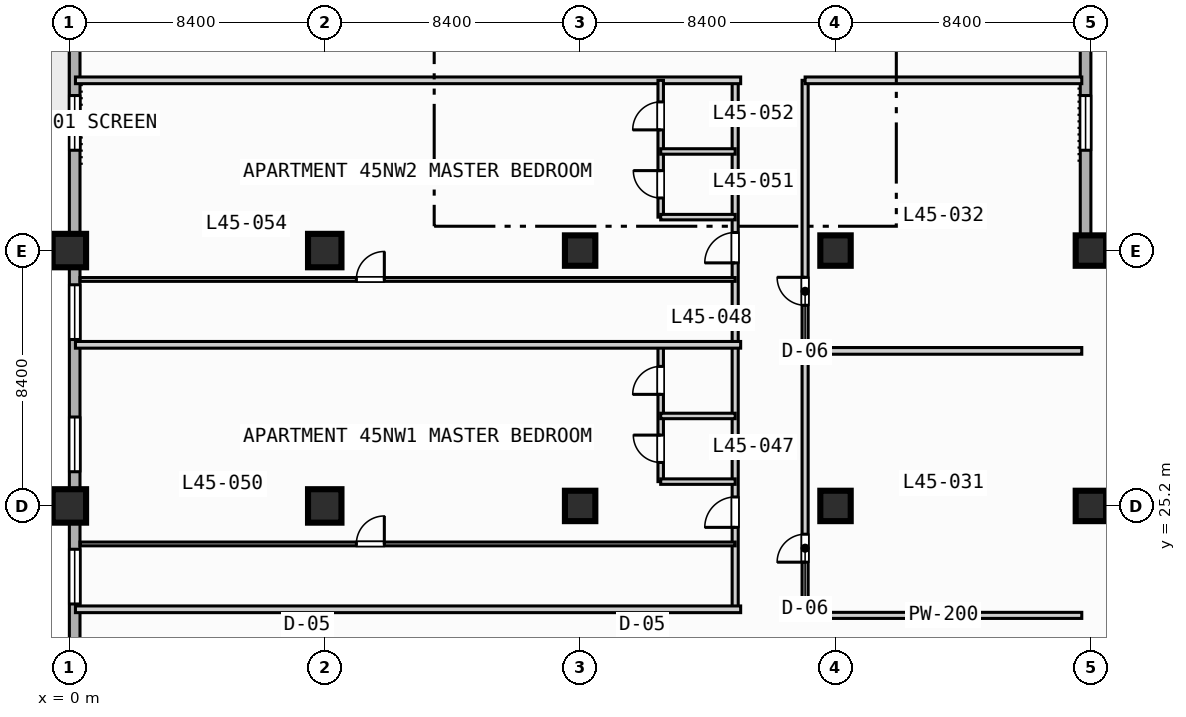
"""IFC4 building model, lengths in metres.
Left out: names, types, materials, properties, quantities, classifications, styles, units other than length and angle.
Written with IfcOpenShell. Run it as: python <this file> out.ifc"""

import sys

from ifc_helpers import new_model, si_unit, direction, frame, frame_2d, origin, origin_2d, place, context, subcontext, project, spatial, rectangle, extrude, element, fill, save


model = new_model("IFC4")
c1 = context("Model", 3, precision=1e-05, world=origin(), true_north=direction((0.0, 1.0)))
c2 = subcontext(c1, "Body", "Model", "MODEL_VIEW")
j1 = project(units=[si_unit("LENGTHUNIT", "METRE"), si_unit("PLANEANGLEUNIT", "RADIAN")], contexts=[c1])
p1 = place(None, origin())
s1 = spatial("IfcSite", under=j1, at=p1, CompositionType="ELEMENT")
p2 = place(p1, origin())
s2 = spatial("IfcBuilding", under=s1, at=p2, CompositionType="ELEMENT")
p3 = place(p2, frame((0.0, 0.0, 186.5)))
s3 = spatial("IfcBuildingStorey", under=s2, at=p3, CompositionType="ELEMENT", Elevation=186.5)
for number, where, z_axis, x_axis in (
    (1, (0.0, 25.2, 0.0), (0.0, 0.0, 1.0), (1.0, 0.0, 0.0)),
    (2, (0.0, 33.6, 0.0), (0.0, 0.0, 1.0), (1.0, 0.0, 0.0)),
    (3, (8.4, 25.2, 0.0), (0.0, 0.0, 1.0), (1.0, 0.0, 0.0)),
    (4, (8.4, 33.6, 0.0), (0.0, 0.0, 1.0), (1.0, 0.0, 0.0)),
):
    element("IfcColumn", number, at=place(p3, frame(where, z_axis=z_axis, x_axis=x_axis)), inside=s3, PredefinedType="COLUMN", context=c2, shape_type="SweptSolid", body=[
        extrude(rectangle(XDim=1.1, YDim=1.1, at=origin_2d()), origin(), (0.0, 0.0, 1.0), 3.7),
    ])
for number, where, z_axis, x_axis in (
    (5, (16.8, 25.2, 0.0), (0.0, 0.0, 1.0), (1.0, 0.0, 0.0)),
    (6, (16.8, 33.6, 0.0), (0.0, 0.0, 1.0), (1.0, 0.0, 0.0)),
    (7, (25.2, 25.2, 0.0), (0.0, 0.0, 1.0), (1.0, 0.0, 0.0)),
    (8, (25.2, 33.6, 0.0), (0.0, 0.0, 1.0), (1.0, 0.0, 0.0)),
    (9, (33.6, 25.2, 0.0), (0.0, 0.0, 1.0), (1.0, 0.0, 0.0)),
    (10, (33.6, 33.6, 0.0), (0.0, 0.0, 1.0), (1.0, 0.0, 0.0)),
):
    element("IfcColumn", number, at=place(p3, frame(where, z_axis=z_axis, x_axis=x_axis)), inside=s3, PredefinedType="COLUMN", context=c2, shape_type="SweptSolid", body=[
        extrude(rectangle(XDim=1.0, YDim=1.0, at=origin_2d()), origin(), (0.0, 0.0, 1.0), 3.7),
    ])
p4 = place(p3, frame((0.175, 3.175, 0.0), z_axis=(0.0, 0.0, 1.0), x_axis=(0.0, 1.0, 0.0)))
e11 = element("IfcWall", 11, at=p4, inside=s3, PredefinedType="STANDARD", context=c2, shape_type="SweptSolid", body=[
    extrude(rectangle(XDim=69.25, YDim=0.35, at=frame_2d((34.625, 0.0))), origin(), (0.0, 0.0, 1.0), 3.47),
])
p5 = place(p4, frame((42.325, 0.0, 0.0)))
e12 = element("IfcOpeningElement", 12, at=p5, cuts=e11, PredefinedType="OPENING", context=c2, shape_type="SweptSolid", body=[
    extrude(rectangle(XDim=1.4, YDim=2.2, at=frame_2d((0.7, 1.1))), frame((0.0, 0.185, 0.0), z_axis=(0.0, -1.0, 0.0), x_axis=(1.0, 0.0, 0.0)), (0.0, 0.0, 1.0), 0.37),
])
p6 = place(p4, frame((33.725, 0.0, 0.85)))
e13 = element("IfcOpeningElement", 13, at=p6, cuts=e11, PredefinedType="OPENING", context=c2, shape_type="SweptSolid", body=[
    extrude(rectangle(XDim=1.8, YDim=1.8, at=frame_2d((0.9, 0.9))), frame((0.0, 0.185, 0.0), z_axis=(0.0, -1.0, 0.0), x_axis=(1.0, 0.0, 0.0)), (0.0, 0.0, 1.0), 0.37),
])
p7 = place(p4, frame((18.8, 0.0, 0.85)))
e14 = element("IfcOpeningElement", 14, at=p7, cuts=e11, PredefinedType="OPENING", context=c2, shape_type="SweptSolid", body=[
    extrude(rectangle(XDim=1.8, YDim=1.8, at=frame_2d((0.9, 0.9))), frame((0.0, 0.185, 0.0), z_axis=(0.0, -1.0, 0.0), x_axis=(1.0, 0.0, 0.0)), (0.0, 0.0, 1.0), 0.37),
])
p8 = place(p4, frame((23.15, 0.0, 0.85)))
e15 = element("IfcOpeningElement", 15, at=p8, cuts=e11, PredefinedType="OPENING", context=c2, shape_type="SweptSolid", body=[
    extrude(rectangle(XDim=1.8, YDim=1.8, at=frame_2d((0.9, 0.9))), frame((0.0, 0.185, 0.0), z_axis=(0.0, -1.0, 0.0), x_axis=(1.0, 0.0, 0.0)), (0.0, 0.0, 1.0), 0.37),
])
p9 = place(p4, frame((27.5, 0.0, 0.85)))
e16 = element("IfcOpeningElement", 16, at=p9, cuts=e11, PredefinedType="OPENING", context=c2, shape_type="SweptSolid", body=[
    extrude(rectangle(XDim=1.8, YDim=1.8, at=frame_2d((0.9, 0.9))), frame((0.0, 0.185, 0.0), z_axis=(0.0, -1.0, 0.0), x_axis=(1.0, 0.0, 0.0)), (0.0, 0.0, 1.0), 0.37),
])
p10 = place(p3, frame((33.425, 72.425, 0.0), z_axis=(0.0, 0.0, 1.0), x_axis=(0.0, -1.0, 0.0)))
e17 = element("IfcWall", 17, at=p10, inside=s3, PredefinedType="STANDARD", context=c2, shape_type="SweptSolid", body=[
    extrude(rectangle(XDim=39.0, YDim=0.35, at=frame_2d((19.5, 0.0))), origin(), (0.0, 0.0, 1.0), 3.47),
])
p11 = place(p10, frame((33.725, 0.0, 0.85)))
e18 = element("IfcOpeningElement", 18, at=p11, cuts=e17, PredefinedType="OPENING", context=c2, shape_type="SweptSolid", body=[
    extrude(rectangle(XDim=1.8, YDim=1.8, at=frame_2d((0.9, 0.9))), frame((0.0, 0.185, 0.0), z_axis=(0.0, -1.0, 0.0), x_axis=(1.0, 0.0, 0.0)), (0.0, 0.0, 1.0), 0.37),
])
p12 = place(p10, frame((16.925, 0.0, 0.85)))
e19 = element("IfcOpeningElement", 19, at=p12, cuts=e17, PredefinedType="OPENING", context=c2, shape_type="SweptSolid", body=[
    extrude(rectangle(XDim=1.8, YDim=1.8, at=frame_2d((0.9, 0.9))), frame((0.0, 0.185, 0.0), z_axis=(0.0, -1.0, 0.0), x_axis=(1.0, 0.0, 0.0)), (0.0, 0.0, 1.0), 0.37),
])
p13 = place(p10, frame((8.225, 0.0, 0.85)))
e20 = element("IfcOpeningElement", 20, at=p13, cuts=e17, PredefinedType="OPENING", context=c2, shape_type="SweptSolid", body=[
    extrude(rectangle(XDim=2.4, YDim=1.95, at=frame_2d((1.2, 0.975))), frame((0.0, 0.185, 0.0), z_axis=(0.0, -1.0, 0.0), x_axis=(1.0, 0.0, 0.0)), (0.0, 0.0, 1.0), 0.37),
])
p14 = place(p3, frame((33.425, 33.425, 0.0), z_axis=(0.0, 0.0, 1.0), x_axis=(1.0, 0.0, 0.0)))
e21 = element("IfcWall", 21, at=p14, inside=s3, PredefinedType="STANDARD", context=c2, shape_type="SweptSolid", body=[
    extrude(rectangle(XDim=39.0, YDim=0.35, at=frame_2d((19.5, 0.0))), origin(), (0.0, 0.0, 1.0), 3.47),
])
p15 = place(p14, frame((12.075, 0.0, 0.0)))
e22 = element("IfcOpeningElement", 22, at=p15, cuts=e21, PredefinedType="OPENING", context=c2, shape_type="SweptSolid", body=[
    extrude(rectangle(XDim=1.4, YDim=2.2, at=frame_2d((0.7, 1.1))), frame((0.0, 0.185, 0.0), z_axis=(0.0, -1.0, 0.0), x_axis=(1.0, 0.0, 0.0)), (0.0, 0.0, 1.0), 0.37),
])
p16 = place(p14, frame((20.275, 0.0, 0.85)))
e23 = element("IfcOpeningElement", 23, at=p16, cuts=e21, PredefinedType="OPENING", context=c2, shape_type="SweptSolid", body=[
    extrude(rectangle(XDim=1.8, YDim=1.8, at=frame_2d((0.9, 0.9))), frame((0.0, 0.185, 0.0), z_axis=(0.0, -1.0, 0.0), x_axis=(1.0, 0.0, 0.0)), (0.0, 0.0, 1.0), 0.37),
])
p17 = place(p14, frame((28.375, 0.0, 0.85)))
e24 = element("IfcOpeningElement", 24, at=p17, cuts=e21, PredefinedType="OPENING", context=c2, shape_type="SweptSolid", body=[
    extrude(rectangle(XDim=2.4, YDim=1.95, at=frame_2d((1.2, 0.975))), frame((0.0, 0.185, 0.0), z_axis=(0.0, -1.0, 0.0), x_axis=(1.0, 0.0, 0.0)), (0.0, 0.0, 1.0), 0.37),
])
p18 = place(p3, frame((24.2, 21.6, 0.0), z_axis=(0.0, 0.0, 1.0), x_axis=(0.0, 1.0, 0.0)))
e25 = element("IfcWall", 25, at=p18, inside=s3, PredefinedType="PARTITIONING", context=c2, shape_type="SweptSolid", body=[
    extrude(rectangle(XDim=17.6, YDim=0.2, at=frame_2d((8.8, 0.0))), origin(), (0.0, 0.0, 1.0), 3.47),
])
p19 = place(p18, frame((1.75, 0.0, 0.0)))
e26 = element("IfcOpeningElement", 26, at=p19, cuts=e25, PredefinedType="OPENING", context=c2, shape_type="SweptSolid", body=[
    extrude(rectangle(XDim=0.92, YDim=2.1, at=frame_2d((0.46, 1.05))), frame((0.0, 0.11, 0.0), z_axis=(0.0, -1.0, 0.0), x_axis=(1.0, 0.0, 0.0)), (0.0, 0.0, 1.0), 0.22),
])
p20 = place(p18, frame((10.2, 0.0, 0.0)))
e27 = element("IfcOpeningElement", 27, at=p20, cuts=e25, PredefinedType="OPENING", context=c2, shape_type="SweptSolid", body=[
    extrude(rectangle(XDim=0.92, YDim=2.1, at=frame_2d((0.46, 1.05))), frame((0.0, 0.11, 0.0), z_axis=(0.0, -1.0, 0.0), x_axis=(1.0, 0.0, 0.0)), (0.0, 0.0, 1.0), 0.22),
])
p21 = place(p3, frame((24.2, 21.6, 0.0), z_axis=(0.0, 0.0, 1.0), x_axis=(1.0, 0.0, 0.0)))
e28 = element("IfcWall", 28, at=p21, inside=s3, PredefinedType="PARTITIONING", context=c2, shape_type="SweptSolid", body=[
    extrude(rectangle(XDim=9.1, YDim=0.2, at=frame_2d((4.55, 0.0))), origin(), (0.0, 0.0, 1.0), 3.47),
])
for number, where, z_axis, x_axis in (
    (29, (24.2, 30.3, 0.0), (0.0, 0.0, 1.0), (1.0, 0.0, 0.0)),
    (30, (24.2, 39.2, 0.0), (0.0, 0.0, 1.0), (1.0, 0.0, 0.0)),
):
    element("IfcWall", number, at=place(p3, frame(where, z_axis=z_axis, x_axis=x_axis)), inside=s3, PredefinedType="PARTITIONING", context=c2, shape_type="SweptSolid", body=[
        extrude(rectangle(XDim=9.1, YDim=0.22, at=frame_2d((4.55, 0.0))), origin(), (0.0, 0.0, 1.0), 3.47),
    ])
p22 = place(p3, frame((21.9, 21.8, 0.0), z_axis=(0.0, 0.0, 1.0), x_axis=(0.0, 1.0, 0.0)))
e31 = element("IfcWall", 31, at=p22, inside=s3, PredefinedType="PARTITIONING", context=c2, shape_type="SweptSolid", body=[
    extrude(rectangle(XDim=17.4, YDim=0.2, at=frame_2d((8.7, 0.0))), origin(), (0.0, 0.0, 1.0), 3.47),
])
p23 = place(p22, frame((2.695, 0.0, 0.0)))
e32 = element("IfcOpeningElement", 32, at=p23, cuts=e31, PredefinedType="OPENING", context=c2, shape_type="SweptSolid", body=[
    extrude(rectangle(XDim=1.0, YDim=2.15, at=frame_2d((0.5, 1.075))), frame((0.0, 0.11, 0.0), z_axis=(0.0, -1.0, 0.0), x_axis=(1.0, 0.0, 0.0)), (0.0, 0.0, 1.0), 0.22),
])
p24 = place(p22, frame((11.395, 0.0, 0.0)))
e33 = element("IfcOpeningElement", 33, at=p24, cuts=e31, PredefinedType="OPENING", context=c2, shape_type="SweptSolid", body=[
    extrude(rectangle(XDim=1.0, YDim=2.15, at=frame_2d((0.5, 1.075))), frame((0.0, 0.11, 0.0), z_axis=(0.0, -1.0, 0.0), x_axis=(1.0, 0.0, 0.0)), (0.0, 0.0, 1.0), 0.22),
])
p25 = place(p3, frame((0.2, 21.8, 0.0), z_axis=(0.0, 0.0, 1.0), x_axis=(1.0, 0.0, 0.0)))
e34 = element("IfcWall", 34, at=p25, inside=s3, PredefinedType="PARTITIONING", context=c2, shape_type="SweptSolid", body=[
    extrude(rectangle(XDim=21.88, YDim=0.22, at=frame_2d((10.94, 0.0))), origin(), (0.0, 0.0, 1.0), 3.47),
])
p26 = place(p3, frame((19.45, 26.0, 0.0), z_axis=(0.0, 0.0, 1.0), x_axis=(0.0, 1.0, 0.0)))
e35 = element("IfcWall", 35, at=p26, inside=s3, PredefinedType="PLUMBINGWALL", context=c2, shape_type="SweptSolid", body=[
    extrude(rectangle(XDim=4.5, YDim=0.18, at=frame_2d((2.25, 0.0))), origin(), (0.0, 0.0, 1.0), 3.47),
])
p27 = place(p26, frame((0.63, 0.0, 0.0)))
e36 = element("IfcOpeningElement", 36, at=p27, cuts=e35, PredefinedType="OPENING", context=c2, shape_type="SweptSolid", body=[
    extrude(rectangle(XDim=0.9, YDim=2.1, at=frame_2d((0.45, 1.05))), frame((0.0, 0.1, 0.0), z_axis=(0.0, -1.0, 0.0), x_axis=(1.0, 0.0, 0.0)), (0.0, 0.0, 1.0), 0.2),
])
p28 = place(p26, frame((2.87, 0.0, 0.0)))
e37 = element("IfcOpeningElement", 37, at=p28, cuts=e35, PredefinedType="OPENING", context=c2, shape_type="SweptSolid", body=[
    extrude(rectangle(XDim=0.92, YDim=2.1, at=frame_2d((0.46, 1.05))), frame((0.0, 0.1, 0.0), z_axis=(0.0, -1.0, 0.0), x_axis=(1.0, 0.0, 0.0)), (0.0, 0.0, 1.0), 0.2),
])
for number, where, z_axis, x_axis in (
    (38, (19.45, 26.0, 0.0), (0.0, 0.0, 1.0), (1.0, 0.0, 0.0)),
    (39, (19.45, 28.16, 0.0), (0.0, 0.0, 1.0), (1.0, 0.0, 0.0)),
):
    element("IfcWall", number, at=place(p3, frame(where, z_axis=z_axis, x_axis=x_axis)), inside=s3, PredefinedType="PLUMBINGWALL", context=c2, shape_type="SweptSolid", body=[
        extrude(rectangle(XDim=2.45, YDim=0.18, at=frame_2d((1.225, 0.0))), origin(), (0.0, 0.0, 1.0), 3.47),
    ])
p29 = place(p3, frame((0.35, 23.95, 0.0), z_axis=(0.0, 0.0, 1.0), x_axis=(1.0, 0.0, 0.0)))
e40 = element("IfcWall", 40, at=p29, inside=s3, PredefinedType="PARTITIONING", context=c2, shape_type="SweptSolid", body=[
    extrude(rectangle(XDim=21.55, YDim=0.125, at=frame_2d((10.775, 0.0))), origin(), (0.0, 0.0, 1.0), 3.47),
])
p30 = place(p29, frame((9.09, 0.0, 0.0)))
e41 = element("IfcOpeningElement", 41, at=p30, cuts=e40, PredefinedType="OPENING", context=c2, shape_type="SweptSolid", body=[
    extrude(rectangle(XDim=0.92, YDim=2.1, at=frame_2d((0.46, 1.05))), frame((0.0, 0.073, 0.0), z_axis=(0.0, -1.0, 0.0), x_axis=(1.0, 0.0, 0.0)), (0.0, 0.0, 1.0), 0.145),
])
for number, where, z_axis, x_axis in (
    (42, (0.2, 30.5, 0.0), (0.0, 0.0, 1.0), (1.0, 0.0, 0.0)),
    (43, (0.2, 39.2, 0.0), (0.0, 0.0, 1.0), (1.0, 0.0, 0.0)),
):
    element("IfcWall", number, at=place(p3, frame(where, z_axis=z_axis, x_axis=x_axis)), inside=s3, PredefinedType="PARTITIONING", context=c2, shape_type="SweptSolid", body=[
        extrude(rectangle(XDim=21.88, YDim=0.22, at=frame_2d((10.94, 0.0))), origin(), (0.0, 0.0, 1.0), 3.47),
    ])
p31 = place(p3, frame((19.45, 34.7, 0.0), z_axis=(0.0, 0.0, 1.0), x_axis=(0.0, 1.0, 0.0)))
e44 = element("IfcWall", 44, at=p31, inside=s3, PredefinedType="PLUMBINGWALL", context=c2, shape_type="SweptSolid", body=[
    extrude(rectangle(XDim=4.5, YDim=0.18, at=frame_2d((2.25, 0.0))), origin(), (0.0, 0.0, 1.0), 3.47),
])
p32 = place(p31, frame((0.63, 0.0, 0.0)))
e45 = element("IfcOpeningElement", 45, at=p32, cuts=e44, PredefinedType="OPENING", context=c2, shape_type="SweptSolid", body=[
    extrude(rectangle(XDim=0.9, YDim=2.1, at=frame_2d((0.45, 1.05))), frame((0.0, 0.1, 0.0), z_axis=(0.0, -1.0, 0.0), x_axis=(1.0, 0.0, 0.0)), (0.0, 0.0, 1.0), 0.2),
])
p33 = place(p31, frame((2.87, 0.0, 0.0)))
e46 = element("IfcOpeningElement", 46, at=p33, cuts=e44, PredefinedType="OPENING", context=c2, shape_type="SweptSolid", body=[
    extrude(rectangle(XDim=0.92, YDim=2.1, at=frame_2d((0.46, 1.05))), frame((0.0, 0.1, 0.0), z_axis=(0.0, -1.0, 0.0), x_axis=(1.0, 0.0, 0.0)), (0.0, 0.0, 1.0), 0.2),
])
for number, where, z_axis, x_axis in (
    (47, (19.45, 34.7, 0.0), (0.0, 0.0, 1.0), (1.0, 0.0, 0.0)),
    (48, (19.45, 36.86, 0.0), (0.0, 0.0, 1.0), (1.0, 0.0, 0.0)),
):
    element("IfcWall", number, at=place(p3, frame(where, z_axis=z_axis, x_axis=x_axis)), inside=s3, PredefinedType="PLUMBINGWALL", context=c2, shape_type="SweptSolid", body=[
        extrude(rectangle(XDim=2.45, YDim=0.18, at=frame_2d((1.225, 0.0))), origin(), (0.0, 0.0, 1.0), 3.47),
    ])
p34 = place(p3, frame((0.35, 32.65, 0.0), z_axis=(0.0, 0.0, 1.0), x_axis=(1.0, 0.0, 0.0)))
e49 = element("IfcWall", 49, at=p34, inside=s3, PredefinedType="PARTITIONING", context=c2, shape_type="SweptSolid", body=[
    extrude(rectangle(XDim=21.55, YDim=0.125, at=frame_2d((10.775, 0.0))), origin(), (0.0, 0.0, 1.0), 3.47),
])
p35 = place(p34, frame((9.09, 0.0, 0.0)))
e50 = element("IfcOpeningElement", 50, at=p35, cuts=e49, PredefinedType="OPENING", context=c2, shape_type="SweptSolid", body=[
    extrude(rectangle(XDim=0.92, YDim=2.1, at=frame_2d((0.46, 1.05))), frame((0.0, 0.073, 0.0), z_axis=(0.0, -1.0, 0.0), x_axis=(1.0, 0.0, 0.0)), (0.0, 0.0, 1.0), 0.145),
])
p36 = place(p6, origin())
e51 = element("IfcWindow", 51, at=p36, inside=s3, PartitioningType="SINGLE_PANEL", PredefinedType="WINDOW", context=c2, shape_type="SweptSolid", body=[
    extrude(rectangle(XDim=1.8, YDim=1.8, at=frame_2d((0.9, 0.9))), frame((0.0, 0.03, 0.0), z_axis=(0.0, -1.0, 0.0), x_axis=(1.0, 0.0, 0.0)), (0.0, 0.0, 1.0), 0.06),
])
fill(e13, e51)
p37 = place(p7, origin())
e52 = element("IfcWindow", 52, at=p37, inside=s3, PartitioningType="SINGLE_PANEL", PredefinedType="WINDOW", context=c2, shape_type="SweptSolid", body=[
    extrude(rectangle(XDim=1.8, YDim=1.8, at=frame_2d((0.9, 0.9))), frame((0.0, 0.03, 0.0), z_axis=(0.0, -1.0, 0.0), x_axis=(1.0, 0.0, 0.0)), (0.0, 0.0, 1.0), 0.06),
])
fill(e14, e52)
p38 = place(p8, origin())
e53 = element("IfcWindow", 53, at=p38, inside=s3, PartitioningType="SINGLE_PANEL", PredefinedType="WINDOW", context=c2, shape_type="SweptSolid", body=[
    extrude(rectangle(XDim=1.8, YDim=1.8, at=frame_2d((0.9, 0.9))), frame((0.0, 0.03, 0.0), z_axis=(0.0, -1.0, 0.0), x_axis=(1.0, 0.0, 0.0)), (0.0, 0.0, 1.0), 0.06),
])
fill(e15, e53)
p39 = place(p9, origin())
e54 = element("IfcWindow", 54, at=p39, inside=s3, PartitioningType="SINGLE_PANEL", PredefinedType="WINDOW", context=c2, shape_type="SweptSolid", body=[
    extrude(rectangle(XDim=1.8, YDim=1.8, at=frame_2d((0.9, 0.9))), frame((0.0, 0.03, 0.0), z_axis=(0.0, -1.0, 0.0), x_axis=(1.0, 0.0, 0.0)), (0.0, 0.0, 1.0), 0.06),
])
fill(e16, e54)
p40 = place(p11, origin())
e55 = element("IfcWindow", 55, at=p40, inside=s3, PartitioningType="SINGLE_PANEL", PredefinedType="WINDOW", context=c2, shape_type="SweptSolid", body=[
    extrude(rectangle(XDim=1.8, YDim=1.8, at=frame_2d((0.9, 0.9))), frame((0.0, 0.03, 0.0), z_axis=(0.0, -1.0, 0.0), x_axis=(1.0, 0.0, 0.0)), (0.0, 0.0, 1.0), 0.06),
])
fill(e18, e55)
p41 = place(p19, origin())
e56 = element("IfcDoor", 56, at=p41, inside=s3, OperationType="SINGLE_SWING_LEFT", PredefinedType="DOOR", context=c2, shape_type="SweptSolid", body=[
    extrude(rectangle(XDim=0.92, YDim=2.1, at=frame_2d((0.46, 1.05))), frame((0.0, 0.025, 0.0), z_axis=(0.0, -1.0, 0.0), x_axis=(1.0, 0.0, 0.0)), (0.0, 0.0, 1.0), 0.05),
])
fill(e26, e56)
p42 = place(p20, origin())
e57 = element("IfcDoor", 57, at=p42, inside=s3, OperationType="SINGLE_SWING_RIGHT", PredefinedType="DOOR", context=c2, shape_type="SweptSolid", body=[
    extrude(rectangle(XDim=0.92, YDim=2.1, at=frame_2d((0.46, 1.05))), frame((0.0, 0.025, 0.0), z_axis=(0.0, -1.0, 0.0), x_axis=(1.0, 0.0, 0.0)), (0.0, 0.0, 1.0), 0.05),
])
fill(e27, e57)
p43 = place(p23, origin())
e58 = element("IfcDoor", 58, at=p43, inside=s3, OperationType="SINGLE_SWING_LEFT", PredefinedType="DOOR", context=c2, shape_type="SweptSolid", body=[
    extrude(rectangle(XDim=1.0, YDim=2.15, at=frame_2d((0.5, 1.075))), frame((0.0, 0.025, 0.0), z_axis=(0.0, -1.0, 0.0), x_axis=(1.0, 0.0, 0.0)), (0.0, 0.0, 1.0), 0.05),
])
fill(e32, e58)
p44 = place(p24, origin())
e59 = element("IfcDoor", 59, at=p44, inside=s3, OperationType="SINGLE_SWING_LEFT", PredefinedType="DOOR", context=c2, shape_type="SweptSolid", body=[
    extrude(rectangle(XDim=1.0, YDim=2.15, at=frame_2d((0.5, 1.075))), frame((0.0, 0.025, 0.0), z_axis=(0.0, -1.0, 0.0), x_axis=(1.0, 0.0, 0.0)), (0.0, 0.0, 1.0), 0.05),
])
fill(e33, e59)
p45 = place(p27, origin())
e60 = element("IfcDoor", 60, at=p45, inside=s3, OperationType="SINGLE_SWING_RIGHT", PredefinedType="DOOR", context=c2, shape_type="SweptSolid", body=[
    extrude(rectangle(XDim=0.9, YDim=2.1, at=frame_2d((0.45, 1.05))), frame((0.0, 0.025, 0.0), z_axis=(0.0, -1.0, 0.0), x_axis=(1.0, 0.0, 0.0)), (0.0, 0.0, 1.0), 0.05),
])
fill(e36, e60)
p46 = place(p28, origin())
e61 = element("IfcDoor", 61, at=p46, inside=s3, OperationType="SINGLE_SWING_LEFT", PredefinedType="DOOR", context=c2, shape_type="SweptSolid", body=[
    extrude(rectangle(XDim=0.92, YDim=2.1, at=frame_2d((0.46, 1.05))), frame((0.0, 0.025, 0.0), z_axis=(0.0, -1.0, 0.0), x_axis=(1.0, 0.0, 0.0)), (0.0, 0.0, 1.0), 0.05),
])
fill(e37, e61)
p47 = place(p30, origin())
e62 = element("IfcDoor", 62, at=p47, inside=s3, OperationType="SINGLE_SWING_RIGHT", PredefinedType="DOOR", context=c2, shape_type="SweptSolid", body=[
    extrude(rectangle(XDim=0.92, YDim=2.1, at=frame_2d((0.46, 1.05))), frame((0.0, 0.025, 0.0), z_axis=(0.0, -1.0, 0.0), x_axis=(1.0, 0.0, 0.0)), (0.0, 0.0, 1.0), 0.05),
])
fill(e41, e62)
p48 = place(p32, origin())
e63 = element("IfcDoor", 63, at=p48, inside=s3, OperationType="SINGLE_SWING_RIGHT", PredefinedType="DOOR", context=c2, shape_type="SweptSolid", body=[
    extrude(rectangle(XDim=0.9, YDim=2.1, at=frame_2d((0.45, 1.05))), frame((0.0, 0.025, 0.0), z_axis=(0.0, -1.0, 0.0), x_axis=(1.0, 0.0, 0.0)), (0.0, 0.0, 1.0), 0.05),
])
fill(e45, e63)
p49 = place(p33, origin())
e64 = element("IfcDoor", 64, at=p49, inside=s3, OperationType="SINGLE_SWING_LEFT", PredefinedType="DOOR", context=c2, shape_type="SweptSolid", body=[
    extrude(rectangle(XDim=0.92, YDim=2.1, at=frame_2d((0.46, 1.05))), frame((0.0, 0.025, 0.0), z_axis=(0.0, -1.0, 0.0), x_axis=(1.0, 0.0, 0.0)), (0.0, 0.0, 1.0), 0.05),
])
fill(e46, e64)
p50 = place(p35, origin())
e65 = element("IfcDoor", 65, at=p50, inside=s3, OperationType="SINGLE_SWING_RIGHT", PredefinedType="DOOR", context=c2, shape_type="SweptSolid", body=[
    extrude(rectangle(XDim=0.92, YDim=2.1, at=frame_2d((0.46, 1.05))), frame((0.0, 0.025, 0.0), z_axis=(0.0, -1.0, 0.0), x_axis=(1.0, 0.0, 0.0)), (0.0, 0.0, 1.0), 0.05),
])
fill(e50, e65)
save(model, sys.argv[1])
